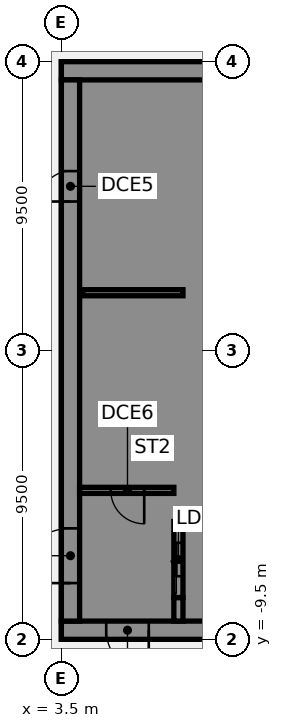
"""IFC4 building model, lengths in metres.
Left out: names, types, materials, properties, quantities, classifications, styles, units other than length and angle.
Written with IfcOpenShell. Run it as: python <this file> out.ifc"""

import sys

from ifc_helpers import new_model, si_unit, direction, frame, frame_2d, origin, place, context, subcontext, project, spatial, polyline, rectangle, outline, extrude, element, fill, save


model = new_model("IFC4")
c1 = context("Model", 3, precision=1e-05, world=origin(), true_north=direction((0.0, 1.0)))
c2 = subcontext(c1, "Body", "Model", "MODEL_VIEW")
j1 = project(units=[si_unit("LENGTHUNIT", "METRE"), si_unit("PLANEANGLEUNIT", "RADIAN")], contexts=[c1])
p1 = place(None, origin())
s1 = spatial("IfcSite", under=j1, at=p1, CompositionType="ELEMENT")
p2 = place(p1, origin())
s2 = spatial("IfcBuilding", under=s1, at=p2, CompositionType="ELEMENT")
p3 = place(p2, frame((0.0, 0.0, 102.25)))
s3 = spatial("IfcBuildingStorey", under=s2, at=p3, CompositionType="ELEMENT", Elevation=102.25)
p4 = place(p3, frame((16.5, -9.2, 0.0), z_axis=(0.0, 0.0, 1.0), x_axis=(-1.0, 0.0, 0.0)))
e1 = element("IfcWall", 1, at=p4, inside=s3, PredefinedType="SHEAR", context=c2, shape_type="SweptSolid", body=[
    extrude(rectangle(XDim=13.0, YDim=0.6, at=frame_2d((6.5, 0.0))), origin(), (0.0, 0.0, 1.0), 3.61),
])
p5 = place(p4, frame((4.15, 0.0, 0.0)))
e2 = element("IfcOpeningElement", 2, at=p5, cuts=e1, PredefinedType="OPENING", context=c2, shape_type="SweptSolid", body=[
    extrude(rectangle(XDim=1.4, YDim=2.1, at=frame_2d((0.7, 1.05))), frame((0.0, 0.31, 0.0), z_axis=(0.0, -1.0, 0.0), x_axis=(1.0, 0.0, 0.0)), (0.0, 0.0, 1.0), 0.62),
])
p6 = place(p4, frame((10.125, 0.0, 0.0)))
e3 = element("IfcOpeningElement", 3, at=p6, cuts=e1, PredefinedType="OPENING", context=c2, shape_type="SweptSolid", body=[
    extrude(rectangle(XDim=1.4, YDim=2.1, at=frame_2d((0.7, 1.05))), frame((0.0, 0.31, 0.0), z_axis=(0.0, -1.0, 0.0), x_axis=(1.0, 0.0, 0.0)), (0.0, 0.0, 1.0), 0.62),
])
p7 = place(p3, frame((16.5, 9.2, 0.0), z_axis=(0.0, 0.0, 1.0), x_axis=(-1.0, 0.0, 0.0)))
e4 = element("IfcWall", 4, at=p7, inside=s3, PredefinedType="SHEAR", context=c2, shape_type="SweptSolid", body=[
    extrude(rectangle(XDim=13.0, YDim=0.6, at=frame_2d((6.5, 0.0))), origin(), (0.0, 0.0, 1.0), 3.61),
])
p8 = place(p3, origin())
e5 = element("IfcWall", 5, at=p8, inside=s3, PredefinedType="SHEAR", context=c2, shape_type="SweptSolid", body=[
    extrude(outline(polyline([(9.8, -5.375), (7.5, -5.375), (7.5, -2.875), (9.8, -2.875), (9.8, -2.625), (7.5, -2.625), (7.5, -0.125), (9.8, -0.125), (9.8, 0.125), (7.5, 0.125), (7.5, 2.625), (9.8, 2.625), (9.8, 2.875), (7.5, 2.875), (7.5, 5.375), (9.8, 5.375), (9.8, 5.625), (7.5, 5.625), (7.5, 8.125), (9.8, 8.125), (9.8, 8.9), (7.5, 8.9), (7.2, 8.9), (7.2, -5.625), (7.5, -5.625), (9.8, -5.625), (9.8, -5.375)])), origin(), (0.0, 0.0, 1.0), 3.61),
])
p9 = place(p3, origin())
e6 = element("IfcWall", 6, at=p9, inside=s3, PredefinedType="SHEAR", context=c2, shape_type="SweptSolid", body=[
    extrude(outline(polyline([(7.5, -8.125), (7.5, -8.9), (9.8, -8.9), (9.8, -8.125), (9.8, -5.625), (9.55, -5.625), (9.55, -8.125), (7.5, -8.125)])), origin(), (0.0, 0.0, 1.0), 3.61),
])
p10 = place(p3, frame((7.35, -8.9, 0.0), z_axis=(0.0, 0.0, 1.0), x_axis=(0.0, 1.0, 0.0)))
e7 = element("IfcWall", 7, at=p10, inside=s3, PredefinedType="SHEAR", context=c2, shape_type="SweptSolid", body=[
    extrude(rectangle(XDim=0.775, YDim=0.3, at=frame_2d((0.387, 0.0))), origin(), (0.0, 0.0, 1.0), 3.61),
])
p11 = place(p3, frame((7.5, 1.9, 0.0), z_axis=(0.0, 0.0, 1.0), x_axis=(-1.0, 0.0, 0.0)))
e8 = element("IfcWall", 8, at=p11, inside=s3, PredefinedType="SHEAR", context=c2, shape_type="SweptSolid", body=[
    extrude(rectangle(XDim=3.3, YDim=0.2, at=frame_2d((1.65, 0.0))), origin(), (0.0, 0.0, 1.0), 3.61),
])
p12 = place(p3, frame((7.35, -8.125, 0.0), z_axis=(0.0, 0.0, 1.0), x_axis=(0.0, 1.0, 0.0)))
e9 = element("IfcWall", 9, at=p12, inside=s3, PredefinedType="SHEAR", context=c2, shape_type="SweptSolid", body=[
    extrude(rectangle(XDim=2.5, YDim=0.3, at=frame_2d((1.25, 0.0))), origin(), (0.0, 0.0, 1.0), 3.61),
])
p13 = place(p12, frame((0.7, 0.0, 0.0)))
e10 = element("IfcOpeningElement", 10, at=p13, cuts=e9, PredefinedType="OPENING", context=c2, shape_type="SweptSolid", body=[
    extrude(rectangle(XDim=1.1, YDim=2.1, at=frame_2d((0.55, 1.05))), frame((0.0, 0.16, 0.0), z_axis=(0.0, -1.0, 0.0), x_axis=(1.0, 0.0, 0.0)), (0.0, 0.0, 1.0), 0.32),
])
p14 = place(p3, frame((3.8, -8.9, 0.0), z_axis=(0.0, 0.0, 1.0), x_axis=(0.0, 1.0, 0.0)))
e11 = element("IfcWall", 11, at=p14, inside=s3, PredefinedType="SHEAR", context=c2, shape_type="SweptSolid", body=[
    extrude(rectangle(XDim=17.8, YDim=0.6, at=frame_2d((8.9, 0.0))), origin(), (0.0, 0.0, 1.0), 3.61),
])
p15 = place(p14, frame((1.25, 0.0, 0.0)))
e12 = element("IfcOpeningElement", 12, at=p15, cuts=e11, PredefinedType="OPENING", context=c2, shape_type="SweptSolid", body=[
    extrude(rectangle(XDim=1.8, YDim=2.1, at=frame_2d((0.9, 1.05))), frame((0.0, 0.31, 0.0), z_axis=(0.0, -1.0, 0.0), x_axis=(1.0, 0.0, 0.0)), (0.0, 0.0, 1.0), 0.62),
])
p16 = place(p14, frame((13.8, 0.0, 0.0)))
e13 = element("IfcOpeningElement", 13, at=p16, cuts=e11, PredefinedType="OPENING", context=c2, shape_type="SweptSolid", body=[
    extrude(rectangle(XDim=1.0, YDim=2.1, at=frame_2d((0.5, 1.05))), frame((0.0, 0.31, 0.0), z_axis=(0.0, -1.0, 0.0), x_axis=(1.0, 0.0, 0.0)), (0.0, 0.0, 1.0), 0.62),
])
p17 = place(p3, frame((7.2, -4.6, 0.0), z_axis=(0.0, 0.0, 1.0), x_axis=(-1.0, 0.0, 0.0)))
e14 = element("IfcWall", 14, at=p17, inside=s3, PredefinedType="SHEAR", context=c2, shape_type="SweptSolid", body=[
    extrude(rectangle(XDim=3.1, YDim=0.2, at=frame_2d((1.55, 0.0))), origin(), (0.0, 0.0, 1.0), 3.61),
])
p18 = place(p17, frame((0.975, 0.0, 0.0)))
e15 = element("IfcOpeningElement", 15, at=p18, cuts=e14, PredefinedType="OPENING", context=c2, shape_type="SweptSolid", body=[
    extrude(rectangle(XDim=1.1, YDim=2.1, at=frame_2d((0.55, 1.05))), frame((0.0, 0.11, 0.0), z_axis=(0.0, -1.0, 0.0), x_axis=(1.0, 0.0, 0.0)), (0.0, 0.0, 1.0), 0.22),
])
p19 = place(p6, origin())
e16 = element("IfcDoor", 16, at=p19, inside=s3, OperationType="SINGLE_SWING_LEFT", PredefinedType="DOOR", context=c2, shape_type="SweptSolid", body=[
    extrude(rectangle(XDim=1.4, YDim=2.1, at=frame_2d((0.7, 1.05))), frame((0.0, 0.025, 0.0), z_axis=(0.0, -1.0, 0.0), x_axis=(1.0, 0.0, 0.0)), (0.0, 0.0, 1.0), 0.05),
])
fill(e3, e16)
p20 = place(p15, origin())
e17 = element("IfcDoor", 17, at=p20, inside=s3, OperationType="SINGLE_SWING_LEFT", PredefinedType="DOOR", context=c2, shape_type="SweptSolid", body=[
    extrude(rectangle(XDim=1.8, YDim=2.1, at=frame_2d((0.9, 1.05))), frame((0.0, 0.025, 0.0), z_axis=(0.0, -1.0, 0.0), x_axis=(1.0, 0.0, 0.0)), (0.0, 0.0, 1.0), 0.05),
])
fill(e12, e17)
p21 = place(p16, origin())
e18 = element("IfcDoor", 18, at=p21, inside=s3, OperationType="SINGLE_SWING_LEFT", PredefinedType="DOOR", context=c2, shape_type="SweptSolid", body=[
    extrude(rectangle(XDim=1.0, YDim=2.1, at=frame_2d((0.5, 1.05))), frame((0.0, 0.025, 0.0), z_axis=(0.0, -1.0, 0.0), x_axis=(1.0, 0.0, 0.0)), (0.0, 0.0, 1.0), 0.05),
])
fill(e13, e18)
p22 = place(p18, origin())
e19 = element("IfcDoor", 19, at=p22, inside=s3, OperationType="SINGLE_SWING_LEFT", PredefinedType="DOOR", context=c2, shape_type="SweptSolid", body=[
    extrude(rectangle(XDim=1.1, YDim=2.1, at=frame_2d((0.55, 1.05))), frame((0.0, 0.025, 0.0), z_axis=(0.0, -1.0, 0.0), x_axis=(1.0, 0.0, 0.0)), (0.0, 0.0, 1.0), 0.05),
])
fill(e15, e19)
p23 = place(p13, origin())
e20 = element("IfcDoor", 20, at=p23, inside=s3, OperationType="SLIDING_TO_LEFT", PredefinedType="DOOR", context=c2, shape_type="SweptSolid", body=[
    extrude(rectangle(XDim=1.1, YDim=2.1, at=frame_2d((0.55, 1.05))), frame((0.0, 0.025, 0.0), z_axis=(0.0, -1.0, 0.0), x_axis=(1.0, 0.0, 0.0)), (0.0, 0.0, 1.0), 0.05),
])
fill(e10, e20)
save(model, sys.argv[1])
